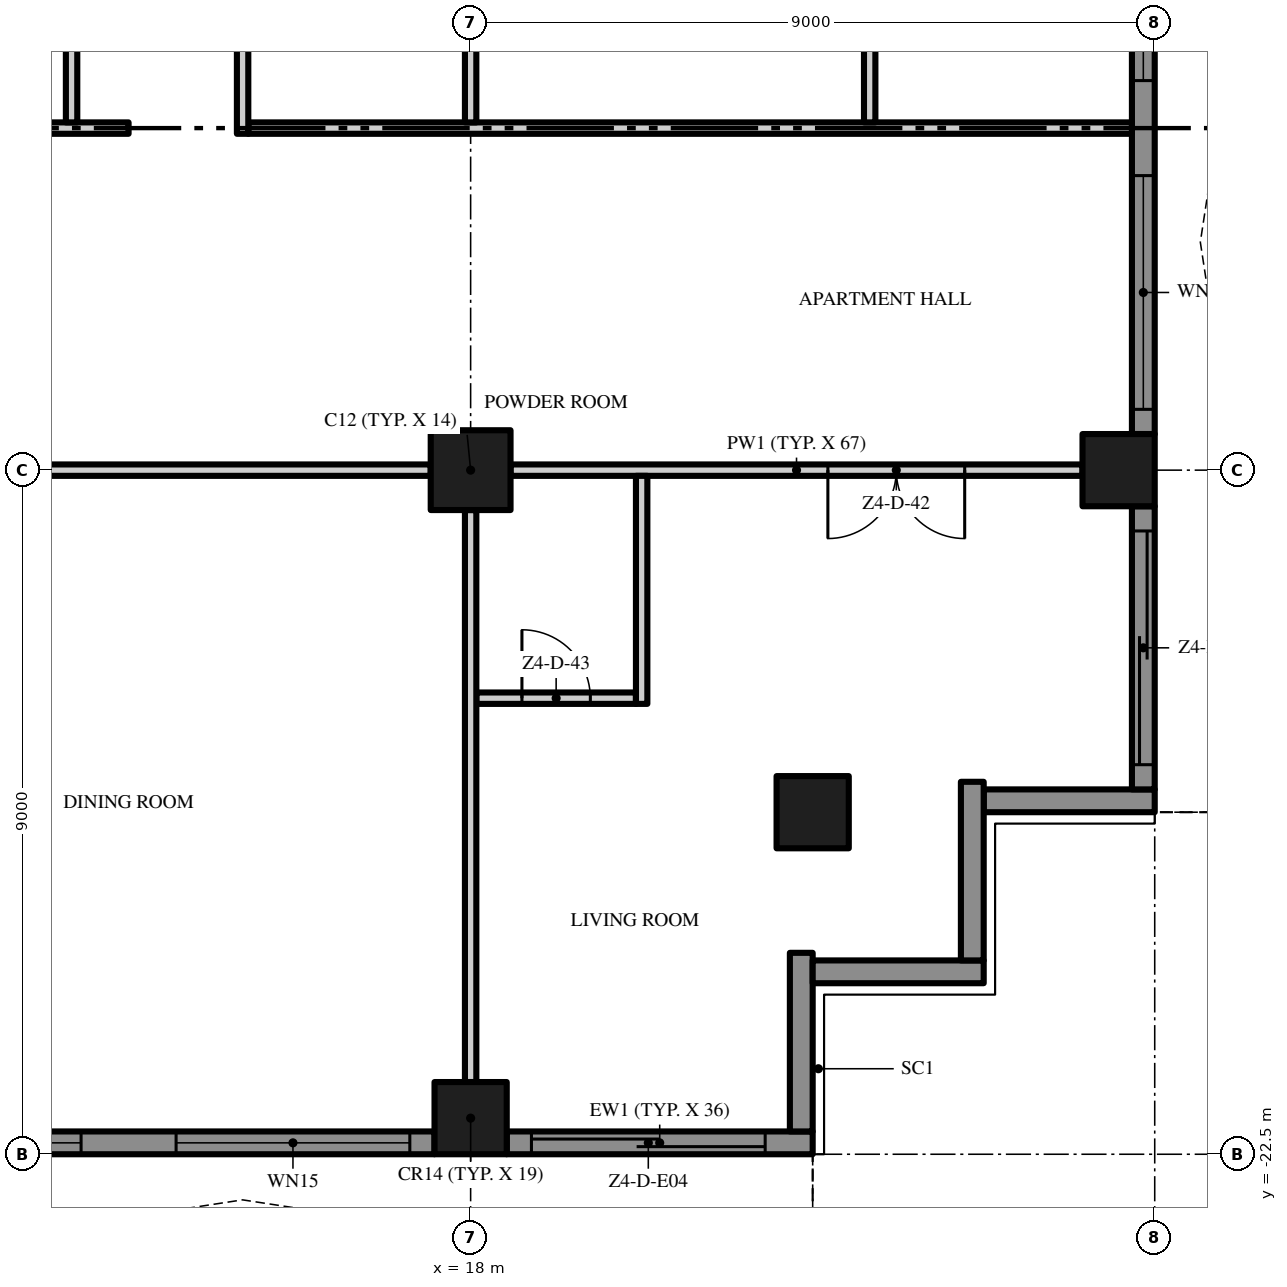
"""IFC4 building model, lengths in metres.
Left out: names, types, materials, properties, quantities, classifications, styles, units other than length and angle.
Written with IfcOpenShell. Run it as: python <this file> out.ifc"""

import sys

from ifc_helpers import new_model, si_unit, direction, frame, frame_2d, origin, origin_2d, place, context, subcontext, project, spatial, polyline, rectangle, outline, extrude, element, fill, save


model = new_model("IFC4")
c1 = context("Model", 3, precision=1e-05, world=origin(), true_north=direction((0.0, 1.0)))
c2 = subcontext(c1, "Body", "Model", "MODEL_VIEW")
j1 = project(units=[si_unit("LENGTHUNIT", "METRE"), si_unit("PLANEANGLEUNIT", "RADIAN")], contexts=[c1])
p1 = place(None, origin())
s1 = spatial("IfcSite", under=j1, at=p1, CompositionType="ELEMENT")
p2 = place(p1, origin())
s2 = spatial("IfcBuilding", under=s1, at=p2, CompositionType="ELEMENT")
p3 = place(p2, frame((0.0, 0.0, 218.6)))
s3 = spatial("IfcBuildingStorey", under=s2, at=p3, CompositionType="ELEMENT", Elevation=218.6)
p4 = place(p3, frame((18.0, -13.5, 0.0), z_axis=(0.0, 0.0, 1.0), x_axis=(1.0, 0.0, 0.0)))
e1 = element("IfcColumn", 1, at=p4, inside=s3, PredefinedType="COLUMN", context=c2, shape_type="SweptSolid", body=[
    extrude(rectangle(XDim=1.05, YDim=1.05, at=origin_2d()), origin(), (0.0, 0.0, 1.0), 3.5),
])
for number, where, z_axis, x_axis in (
    (2, (18.0, -22.025, 0.0), (0.0, 0.0, 1.0), (1.0, 0.0, 0.0)),
    (3, (26.525, -13.5, 0.0), (0.0, 0.0, 1.0), (1.0, 0.0, 0.0)),
    (4, (22.5, -18.0, 0.0), (0.0, 0.0, 1.0), (1.0, 0.0, 0.0)),
):
    element("IfcColumn", number, at=place(p3, frame(where, z_axis=z_axis, x_axis=x_axis)), inside=s3, PredefinedType="COLUMN", context=c2, shape_type="SweptSolid", body=[
        extrude(rectangle(XDim=0.95, YDim=0.95, at=origin_2d()), origin(), (0.0, 0.0, 1.0), 3.5),
    ])
p5 = place(p3, frame((17.525, -22.35, 0.0), z_axis=(0.0, 0.0, 1.0), x_axis=(-1.0, 0.0, 0.0)))
e5 = element("IfcWall", 5, at=p5, inside=s3, PredefinedType="SOLIDWALL", context=c2, shape_type="SweptSolid", body=[
    extrude(rectangle(XDim=8.05, YDim=0.3, at=frame_2d((4.025, 0.0))), origin(), (0.0, 0.0, 1.0), 3.5),
])
p6 = place(p5, frame((4.65, 0.0, 0.45)))
e6 = element("IfcOpeningElement", 6, at=p6, cuts=e5, PredefinedType="OPENING", context=c2, shape_type="SweptSolid", body=[
    extrude(rectangle(XDim=3.075, YDim=2.65, at=frame_2d((1.538, 1.325))), frame((0.0, 0.16, 0.0), z_axis=(0.0, -1.0, 0.0), x_axis=(1.0, 0.0, 0.0)), (0.0, 0.0, 1.0), 0.32),
])
p7 = place(p5, frame((0.325, 0.0, 0.45)))
e7 = element("IfcOpeningElement", 7, at=p7, cuts=e5, PredefinedType="OPENING", context=c2, shape_type="SweptSolid", body=[
    extrude(rectangle(XDim=3.075, YDim=2.65, at=frame_2d((1.538, 1.325))), frame((0.0, 0.16, 0.0), z_axis=(0.0, -1.0, 0.0), x_axis=(1.0, 0.0, 0.0)), (0.0, 0.0, 1.0), 0.32),
])
p8 = place(p3, frame((22.5, -22.35, 0.0), z_axis=(0.0, 0.0, 1.0), x_axis=(-1.0, 0.0, 0.0)))
e8 = element("IfcWall", 8, at=p8, inside=s3, PredefinedType="SOLIDWALL", context=c2, shape_type="SweptSolid", body=[
    extrude(rectangle(XDim=4.025, YDim=0.3, at=frame_2d((2.013, 0.0))), origin(), (0.0, 0.0, 1.0), 3.5),
])
p9 = place(p8, frame((0.625, 0.0, 0.0)))
e9 = element("IfcOpeningElement", 9, at=p9, cuts=e8, PredefinedType="OPENING", context=c2, shape_type="SweptSolid", body=[
    extrude(rectangle(XDim=3.075, YDim=2.4, at=frame_2d((1.538, 1.2))), frame((0.0, 0.16, 0.0), z_axis=(0.0, -1.0, 0.0), x_axis=(1.0, 0.0, 0.0)), (0.0, 0.0, 1.0), 0.32),
])
p10 = place(p3, frame((22.35, -19.85, 0.0), z_axis=(0.0, 0.0, 1.0), x_axis=(0.0, -1.0, 0.0)))
e10 = element("IfcWall", 10, at=p10, inside=s3, PredefinedType="SOLIDWALL", context=c2, shape_type="SweptSolid", body=[
    extrude(rectangle(XDim=2.35, YDim=0.3, at=frame_2d((1.175, 0.0))), origin(), (0.0, 0.0, 1.0), 3.5),
])
p11 = place(p3, frame((24.75, -20.1, 0.0), z_axis=(0.0, 0.0, 1.0), x_axis=(-1.0, 0.0, 0.0)))
e11 = element("IfcWall", 11, at=p11, inside=s3, PredefinedType="SOLIDWALL", context=c2, shape_type="SweptSolid", body=[
    extrude(rectangle(XDim=2.25, YDim=0.3, at=frame_2d((1.125, 0.0))), origin(), (0.0, 0.0, 1.0), 3.5),
])
p12 = place(p3, frame((24.6, -17.6, 0.0), z_axis=(0.0, 0.0, 1.0), x_axis=(0.0, -1.0, 0.0)))
e12 = element("IfcWall", 12, at=p12, inside=s3, PredefinedType="SOLIDWALL", context=c2, shape_type="SweptSolid", body=[
    extrude(rectangle(XDim=2.35, YDim=0.3, at=frame_2d((1.175, 0.0))), origin(), (0.0, 0.0, 1.0), 3.5),
])
p13 = place(p3, frame((27.0, -17.85, 0.0), z_axis=(0.0, 0.0, 1.0), x_axis=(-1.0, 0.0, 0.0)))
e13 = element("IfcWall", 13, at=p13, inside=s3, PredefinedType="SOLIDWALL", context=c2, shape_type="SweptSolid", body=[
    extrude(rectangle(XDim=2.25, YDim=0.3, at=frame_2d((1.125, 0.0))), origin(), (0.0, 0.0, 1.0), 3.5),
])
p14 = place(p3, frame((26.85, -13.975, 0.0), z_axis=(0.0, 0.0, 1.0), x_axis=(0.0, -1.0, 0.0)))
e14 = element("IfcWall", 14, at=p14, inside=s3, PredefinedType="SOLIDWALL", context=c2, shape_type="SweptSolid", body=[
    extrude(rectangle(XDim=3.725, YDim=0.3, at=frame_2d((1.863, 0.0))), origin(), (0.0, 0.0, 1.0), 3.5),
])
p15 = place(p14, frame((0.325, 0.0, 0.0)))
e15 = element("IfcOpeningElement", 15, at=p15, cuts=e14, PredefinedType="OPENING", context=c2, shape_type="SweptSolid", body=[
    extrude(rectangle(XDim=3.075, YDim=2.4, at=frame_2d((1.538, 1.2))), frame((0.0, 0.16, 0.0), z_axis=(0.0, -1.0, 0.0), x_axis=(1.0, 0.0, 0.0)), (0.0, 0.0, 1.0), 0.32),
])
p16 = place(p3, frame((26.85, -4.975, 0.0), z_axis=(0.0, 0.0, 1.0), x_axis=(0.0, -1.0, 0.0)))
e16 = element("IfcWall", 16, at=p16, inside=s3, PredefinedType="SOLIDWALL", context=c2, shape_type="SweptSolid", body=[
    extrude(rectangle(XDim=8.05, YDim=0.3, at=frame_2d((4.025, 0.0))), origin(), (0.0, 0.0, 1.0), 3.5),
])
p17 = place(p16, frame((4.65, 0.0, 0.45)))
e17 = element("IfcOpeningElement", 17, at=p17, cuts=e16, PredefinedType="OPENING", context=c2, shape_type="SweptSolid", body=[
    extrude(rectangle(XDim=3.075, YDim=2.65, at=frame_2d((1.538, 1.325))), frame((0.0, 0.16, 0.0), z_axis=(0.0, -1.0, 0.0), x_axis=(1.0, 0.0, 0.0)), (0.0, 0.0, 1.0), 0.32),
])
p18 = place(p16, frame((0.325, 0.0, 0.45)))
e18 = element("IfcOpeningElement", 18, at=p18, cuts=e16, PredefinedType="OPENING", context=c2, shape_type="SweptSolid", body=[
    extrude(rectangle(XDim=3.075, YDim=2.65, at=frame_2d((1.538, 1.325))), frame((0.0, 0.16, 0.0), z_axis=(0.0, -1.0, 0.0), x_axis=(1.0, 0.0, 0.0)), (0.0, 0.0, 1.0), 0.32),
])
p19 = place(p3, origin())
e19 = element("IfcWall", 19, at=p19, inside=s3, PredefinedType="USERDEFINED", context=c2, shape_type="SweptSolid", body=[
    extrude(outline(polyline([(-22.5, -25.5), (-21.0, -25.271), (-19.5, -24.671), (-18.0, -23.929), (-16.5, -23.329), (-15.0, -23.1), (-13.5, -23.329), (-12.0, -23.929), (-10.5, -24.671), (-9.0, -25.271), (-7.5, -25.5), (-6.0, -25.271), (-4.5, -24.671), (-3.0, -23.929), (-1.5, -23.329), (0.0, -23.1), (1.5, -23.329), (3.0, -23.929), (4.5, -24.671), (6.0, -25.271), (7.5, -25.5), (9.0, -25.271), (10.5, -24.671), (12.0, -23.929), (13.5, -23.329), (15.0, -23.1), (16.5, -23.329), (18.0, -23.929), (19.5, -24.671), (21.0, -25.271), (22.5, -25.5), (22.538, -25.253), (21.066, -25.028), (19.602, -24.442), (18.102, -23.701), (16.566, -23.086), (15.0, -22.847), (13.434, -23.086), (11.898, -23.701), (10.398, -24.442), (8.934, -25.028), (7.5, -25.247), (6.066, -25.028), (4.602, -24.442), (3.102, -23.701), (1.566, -23.086), (0.0, -22.847), (-1.566, -23.086), (-3.102, -23.701), (-4.602, -24.442), (-6.066, -25.028), (-7.5, -25.247), (-8.934, -25.028), (-10.398, -24.442), (-11.898, -23.701), (-13.434, -23.086), (-15.0, -22.847), (-16.566, -23.086), (-18.102, -23.701), (-19.602, -24.442), (-21.066, -25.028), (-22.538, -25.253), (-22.5, -25.5)])), origin(), (0.0, 0.0, 1.0), 0.9),
])
p20 = place(p3, origin())
e20 = element("IfcWall", 20, at=p20, inside=s3, PredefinedType="USERDEFINED", context=c2, shape_type="SweptSolid", body=[
    extrude(outline(polyline([(30.0, -18.0), (29.771, -16.5), (29.171, -15.0), (28.429, -13.5), (27.829, -12.0), (27.6, -10.5), (27.829, -9.0), (28.429, -7.5), (29.171, -6.0), (29.771, -4.5), (30.0, -3.0), (29.771, -1.5), (29.171, 0.0), (28.429, 1.5), (27.829, 3.0), (27.6, 4.5), (27.829, 6.0), (28.429, 7.5), (29.171, 9.0), (29.771, 10.5), (30.0, 12.0), (29.771, 13.5), (29.171, 15.0), (28.429, 16.5), (27.829, 18.0), (27.597, 17.907), (28.201, 16.398), (28.942, 14.898), (29.528, 13.434), (29.747, 12.0), (29.528, 10.566), (28.942, 9.102), (28.201, 7.602), (27.586, 6.066), (27.347, 4.5), (27.586, 2.934), (28.201, 1.398), (28.942, -0.102), (29.528, -1.566), (29.747, -3.0), (29.528, -4.434), (28.942, -5.898), (28.201, -7.398), (27.586, -8.934), (27.347, -10.5), (27.586, -12.066), (28.201, -13.602), (28.942, -15.102), (29.528, -16.566), (29.753, -18.038), (30.0, -18.0)])), origin(), (0.0, 0.0, 1.0), 0.9),
])
p21 = place(p3, frame((18.075, -16.5, 0.0), z_axis=(0.0, 0.0, 1.0), x_axis=(1.0, 0.0, 0.0)))
e21 = element("IfcWall", 21, at=p21, inside=s3, PredefinedType="PARTITIONING", context=c2, shape_type="SweptSolid", body=[
    extrude(rectangle(XDim=2.1, YDim=0.15, at=frame_2d((1.05, 0.0))), origin(), (0.0, 0.0, 1.0), 3.5),
])
p22 = place(p21, frame((0.6, 0.0, 0.0)))
e22 = element("IfcOpeningElement", 22, at=p22, cuts=e21, PredefinedType="OPENING", context=c2, shape_type="SweptSolid", body=[
    extrude(rectangle(XDim=0.9, YDim=2.1, at=frame_2d((0.45, 1.05))), frame((0.0, 0.085, 0.0), z_axis=(0.0, -1.0, 0.0), x_axis=(1.0, 0.0, 0.0)), (0.0, 0.0, 1.0), 0.17),
])
p23 = place(p3, frame((17.475, -13.5, 0.0), z_axis=(0.0, 0.0, 1.0), x_axis=(-1.0, 0.0, 0.0)))
e23 = element("IfcWall", 23, at=p23, inside=s3, PredefinedType="PARTITIONING", context=c2, shape_type="SweptSolid", body=[
    extrude(rectangle(XDim=7.95, YDim=0.15, at=frame_2d((3.975, 0.0))), origin(), (0.0, 0.0, 1.0), 3.5),
])
p24 = place(p23, frame((5.5, 0.0, 0.0)))
e24 = element("IfcOpeningElement", 24, at=p24, cuts=e23, PredefinedType="OPENING", context=c2, shape_type="SweptSolid", body=[
    extrude(rectangle(XDim=1.5, YDim=2.4, at=frame_2d((0.75, 1.2))), frame((0.0, 0.085, 0.0), z_axis=(0.0, -1.0, 0.0), x_axis=(1.0, 0.0, 0.0)), (0.0, 0.0, 1.0), 0.17),
])
p25 = place(p3, frame((26.05, -13.5, 0.0), z_axis=(0.0, 0.0, 1.0), x_axis=(-1.0, 0.0, 0.0)))
e25 = element("IfcWall", 25, at=p25, inside=s3, PredefinedType="PARTITIONING", context=c2, shape_type="SweptSolid", body=[
    extrude(rectangle(XDim=7.525, YDim=0.15, at=frame_2d((3.763, 0.0))), origin(), (0.0, 0.0, 1.0), 3.5),
])
p26 = place(p25, frame((1.55, 0.0, 0.0)))
e26 = element("IfcOpeningElement", 26, at=p26, cuts=e25, PredefinedType="OPENING", context=c2, shape_type="SweptSolid", body=[
    extrude(rectangle(XDim=1.8, YDim=2.4, at=frame_2d((0.9, 1.2))), frame((0.0, 0.085, 0.0), z_axis=(0.0, -1.0, 0.0), x_axis=(1.0, 0.0, 0.0)), (0.0, 0.0, 1.0), 0.17),
])
p27 = place(p3, frame((0.1, -9.0, 0.0), z_axis=(0.0, 0.0, 1.0), x_axis=(1.0, 0.0, 0.0)))
e27 = element("IfcWall", 27, at=p27, inside=s3, PredefinedType="PARTITIONING", context=c2, shape_type="SweptSolid", body=[
    extrude(rectangle(XDim=13.4, YDim=0.15, at=frame_2d((6.7, 0.0))), origin(), (0.0, 0.0, 1.0), 3.5),
])
p28 = place(p27, frame((6.9, 0.0, 0.0)))
e28 = element("IfcOpeningElement", 28, at=p28, cuts=e27, PredefinedType="OPENING", context=c2, shape_type="SweptSolid", body=[
    extrude(rectangle(XDim=1.0, YDim=2.4, at=frame_2d((0.5, 1.2))), frame((0.0, 0.085, 0.0), z_axis=(0.0, -1.0, 0.0), x_axis=(1.0, 0.0, 0.0)), (0.0, 0.0, 1.0), 0.17),
])
p29 = place(p3, frame((15.075, -9.0, 0.0), z_axis=(0.0, 0.0, 1.0), x_axis=(1.0, 0.0, 0.0)))
e29 = element("IfcWall", 29, at=p29, inside=s3, PredefinedType="PARTITIONING", context=c2, shape_type="SweptSolid", body=[
    extrude(rectangle(XDim=11.625, YDim=0.15, at=frame_2d((5.812, 0.0))), origin(), (0.0, 0.0, 1.0), 3.5),
])
p30 = place(p3, frame((12.75, -8.925, 0.0), z_axis=(0.0, 0.0, 1.0), x_axis=(0.0, 1.0, 0.0)))
e30 = element("IfcWall", 30, at=p30, inside=s3, PredefinedType="PARTITIONING", context=c2, shape_type="SweptSolid", body=[
    extrude(rectangle(XDim=4.5, YDim=0.15, at=frame_2d((2.25, 0.0))), origin(), (0.0, 0.0, 1.0), 3.5),
])
p31 = place(p30, frame((1.75, 0.0, 0.0)))
e31 = element("IfcOpeningElement", 31, at=p31, cuts=e30, PredefinedType="OPENING", context=c2, shape_type="SweptSolid", body=[
    extrude(rectangle(XDim=0.9, YDim=2.1, at=frame_2d((0.45, 1.05))), frame((0.0, 0.085, 0.0), z_axis=(0.0, -1.0, 0.0), x_axis=(1.0, 0.0, 0.0)), (0.0, 0.0, 1.0), 0.17),
])
p32 = place(p3, frame((15.0, -9.075, 0.0), z_axis=(0.0, 0.0, 1.0), x_axis=(0.0, 1.0, 0.0)))
e32 = element("IfcWall", 32, at=p32, inside=s3, PredefinedType="PARTITIONING", context=c2, shape_type="SweptSolid", body=[
    extrude(rectangle(XDim=4.65, YDim=0.15, at=frame_2d((2.325, 0.0))), origin(), (0.0, 0.0, 1.0), 3.5),
])
p33 = place(p3, frame((18.0, -21.55, 0.0), z_axis=(0.0, 0.0, 1.0), x_axis=(0.0, 1.0, 0.0)))
e33 = element("IfcWall", 33, at=p33, inside=s3, PredefinedType="PARTITIONING", context=c2, shape_type="SweptSolid", body=[
    extrude(rectangle(XDim=7.525, YDim=0.15, at=frame_2d((3.763, 0.0))), origin(), (0.0, 0.0, 1.0), 3.5),
])
p34 = place(p3, frame((18.0, -8.925, 0.0), z_axis=(0.0, 0.0, 1.0), x_axis=(0.0, 1.0, 0.0)))
e34 = element("IfcWall", 34, at=p34, inside=s3, PredefinedType="PARTITIONING", context=c2, shape_type="SweptSolid", body=[
    extrude(rectangle(XDim=3.9, YDim=0.15, at=frame_2d((1.95, 0.0))), origin(), (0.0, 0.0, 1.0), 3.5),
])
p35 = place(p3, frame((20.25, -16.575, 0.0), z_axis=(0.0, 0.0, 1.0), x_axis=(0.0, 1.0, 0.0)))
e35 = element("IfcWall", 35, at=p35, inside=s3, PredefinedType="PARTITIONING", context=c2, shape_type="SweptSolid", body=[
    extrude(rectangle(XDim=3.0, YDim=0.15, at=frame_2d((1.5, 0.0))), origin(), (0.0, 0.0, 1.0), 3.5),
])
p36 = place(p3, frame((23.25, -4.575, 0.0), z_axis=(0.0, 0.0, 1.0), x_axis=(0.0, -1.0, 0.0)))
e36 = element("IfcWall", 36, at=p36, inside=s3, PredefinedType="PARTITIONING", context=c2, shape_type="SweptSolid", body=[
    extrude(rectangle(XDim=4.35, YDim=0.15, at=frame_2d((2.175, 0.0))), origin(), (0.0, 0.0, 1.0), 3.5),
])
p37 = place(p36, frame((1.7, 0.0, 0.0)))
e37 = element("IfcOpeningElement", 37, at=p37, cuts=e36, PredefinedType="OPENING", context=c2, shape_type="SweptSolid", body=[
    extrude(rectangle(XDim=0.9, YDim=2.1, at=frame_2d((0.45, 1.05))), frame((0.0, 0.085, 0.0), z_axis=(0.0, -1.0, 0.0), x_axis=(1.0, 0.0, 0.0)), (0.0, 0.0, 1.0), 0.17),
])
p38 = place(p6, origin())
e38 = element("IfcWindow", 38, at=p38, inside=s3, PartitioningType="SINGLE_PANEL", PredefinedType="WINDOW", context=c2, shape_type="SweptSolid", body=[
    extrude(rectangle(XDim=3.075, YDim=2.65, at=frame_2d((1.538, 1.325))), frame((0.0, 0.03, 0.0), z_axis=(0.0, -1.0, 0.0), x_axis=(1.0, 0.0, 0.0)), (0.0, 0.0, 1.0), 0.06),
])
fill(e6, e38)
p39 = place(p7, origin())
e39 = element("IfcWindow", 39, at=p39, inside=s3, PartitioningType="SINGLE_PANEL", PredefinedType="WINDOW", context=c2, shape_type="SweptSolid", body=[
    extrude(rectangle(XDim=3.075, YDim=2.65, at=frame_2d((1.538, 1.325))), frame((0.0, 0.03, 0.0), z_axis=(0.0, -1.0, 0.0), x_axis=(1.0, 0.0, 0.0)), (0.0, 0.0, 1.0), 0.06),
])
fill(e7, e39)
p40 = place(p9, origin())
e40 = element("IfcDoor", 40, at=p40, inside=s3, OperationType="SINGLE_SWING_LEFT", PredefinedType="DOOR", context=c2, shape_type="SweptSolid", body=[
    extrude(rectangle(XDim=3.075, YDim=2.4, at=frame_2d((1.538, 1.2))), frame((0.0, 0.025, 0.0), z_axis=(0.0, -1.0, 0.0), x_axis=(1.0, 0.0, 0.0)), (0.0, 0.0, 1.0), 0.05),
])
fill(e9, e40)
p41 = place(p15, origin())
e41 = element("IfcDoor", 41, at=p41, inside=s3, OperationType="SINGLE_SWING_LEFT", PredefinedType="DOOR", context=c2, shape_type="SweptSolid", body=[
    extrude(rectangle(XDim=3.075, YDim=2.4, at=frame_2d((1.538, 1.2))), frame((0.0, 0.025, 0.0), z_axis=(0.0, -1.0, 0.0), x_axis=(1.0, 0.0, 0.0)), (0.0, 0.0, 1.0), 0.05),
])
fill(e15, e41)
p42 = place(p17, origin())
e42 = element("IfcWindow", 42, at=p42, inside=s3, PartitioningType="SINGLE_PANEL", PredefinedType="WINDOW", context=c2, shape_type="SweptSolid", body=[
    extrude(rectangle(XDim=3.075, YDim=2.65, at=frame_2d((1.538, 1.325))), frame((0.0, 0.03, 0.0), z_axis=(0.0, -1.0, 0.0), x_axis=(1.0, 0.0, 0.0)), (0.0, 0.0, 1.0), 0.06),
])
fill(e17, e42)
p43 = place(p18, origin())
e43 = element("IfcWindow", 43, at=p43, inside=s3, PartitioningType="SINGLE_PANEL", PredefinedType="WINDOW", context=c2, shape_type="SweptSolid", body=[
    extrude(rectangle(XDim=3.075, YDim=2.65, at=frame_2d((1.538, 1.325))), frame((0.0, 0.03, 0.0), z_axis=(0.0, -1.0, 0.0), x_axis=(1.0, 0.0, 0.0)), (0.0, 0.0, 1.0), 0.06),
])
fill(e18, e43)
p44 = place(p26, origin())
e44 = element("IfcDoor", 44, at=p44, inside=s3, OperationType="DOUBLE_DOOR_SINGLE_SWING", PredefinedType="DOOR", context=c2, shape_type="SweptSolid", body=[
    extrude(rectangle(XDim=1.8, YDim=2.4, at=frame_2d((0.9, 1.2))), frame((0.0, 0.025, 0.0), z_axis=(0.0, -1.0, 0.0), x_axis=(1.0, 0.0, 0.0)), (0.0, 0.0, 1.0), 0.05),
])
fill(e26, e44)
p45 = place(p22, origin())
e45 = element("IfcDoor", 45, at=p45, inside=s3, OperationType="SINGLE_SWING_LEFT", PredefinedType="DOOR", context=c2, shape_type="SweptSolid", body=[
    extrude(rectangle(XDim=0.9, YDim=2.1, at=frame_2d((0.45, 1.05))), frame((0.0, 0.025, 0.0), z_axis=(0.0, -1.0, 0.0), x_axis=(1.0, 0.0, 0.0)), (0.0, 0.0, 1.0), 0.05),
])
fill(e22, e45)
save(model, sys.argv[1])
